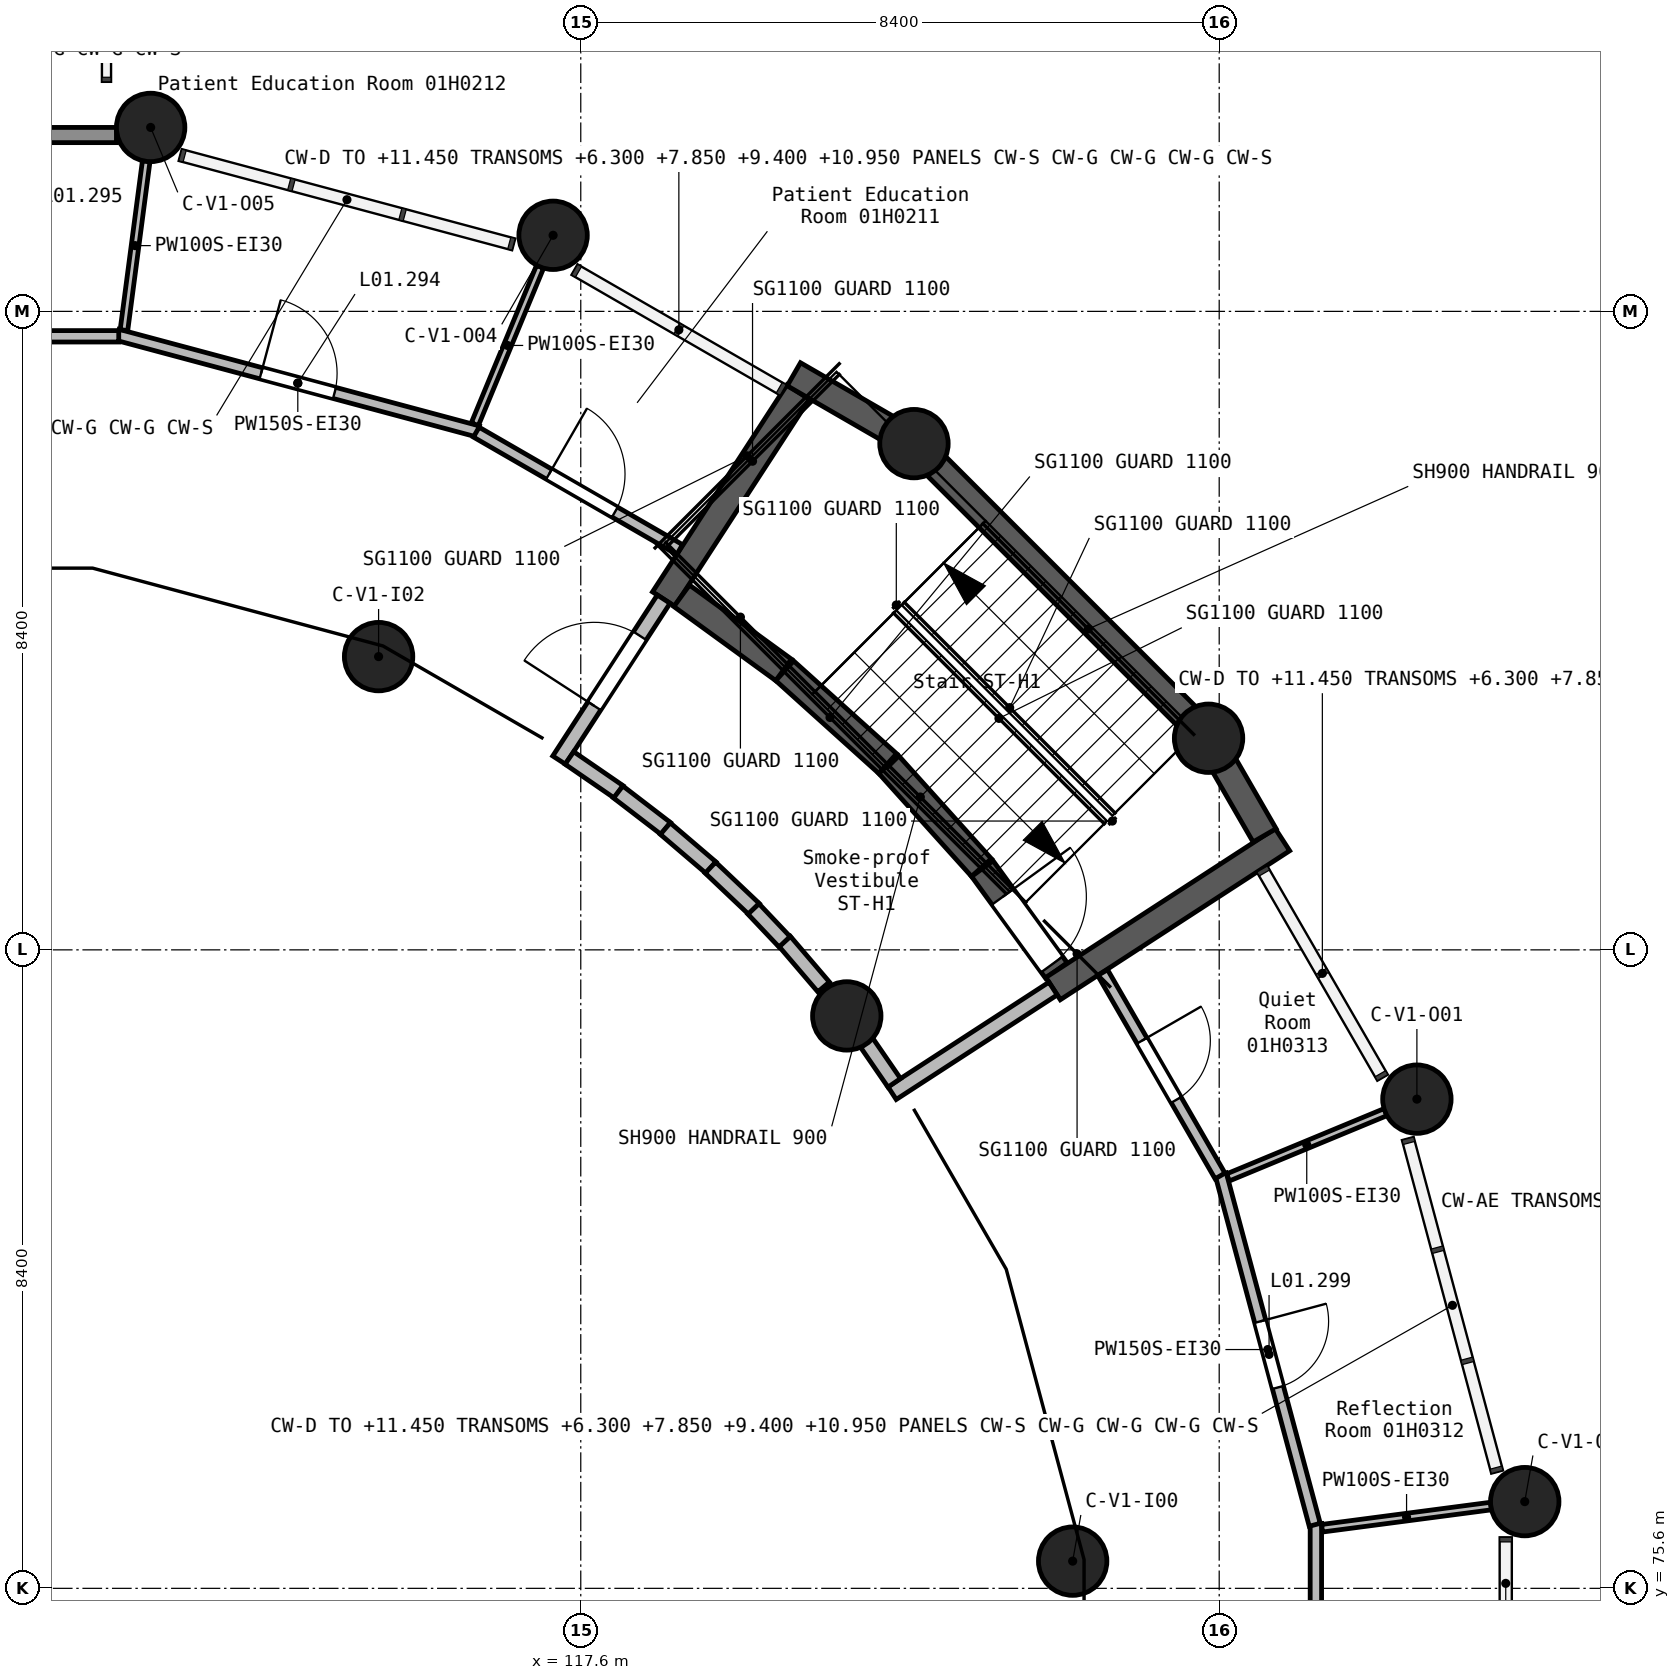
"""IFC4 building model, lengths in metres.
Left out: names, types, materials, properties, quantities, classifications, styles, units other than length and angle.
Written with IfcOpenShell. Run it as: python <this file> out.ifc"""

import sys

from ifc_helpers import new_model, si_unit, direction, frame, frame_2d, origin, origin_2d, place, context, subcontext, project, spatial, rectangle, circle, extrude, element, fill, save


model = new_model("IFC4")
c1 = context("Model", 3, precision=1e-05, world=origin(), true_north=direction((0.0, 1.0)))
c2 = subcontext(c1, "Body", "Model", "MODEL_VIEW")
j1 = project(units=[si_unit("LENGTHUNIT", "METRE"), si_unit("PLANEANGLEUNIT", "RADIAN")], contexts=[c1])
p1 = place(None, origin())
s1 = spatial("IfcSite", under=j1, at=p1, CompositionType="ELEMENT")
p2 = place(p1, origin())
s2 = spatial("IfcBuilding", under=s1, at=p2, CompositionType="ELEMENT")
p3 = place(p2, frame((0.0, 0.0, 5.4)))
s3 = spatial("IfcBuildingStorey", under=s2, at=p3, CompositionType="ELEMENT", Elevation=5.4)
for number, where, z_axis, x_axis in (
    (1, (111.941, 94.82, 0.0), (0.0, 0.0, 1.0), (1.0, 0.0, 0.0)),
    (2, (114.94, 87.858, 0.0), (0.0, 0.0, 1.0), (1.0, 0.0, 0.0)),
    (3, (117.236, 93.401, 0.0), (0.0, 0.0, 1.0), (1.0, 0.0, 0.0)),
    (4, (121.1, 83.131, 0.0), (0.0, 0.0, 1.0), (1.0, 0.0, 0.0)),
    (5, (121.984, 90.66, 0.0), (0.0, 0.0, 1.0), (1.0, 0.0, 0.0)),
    (6, (124.072, 75.958, 0.0), (0.0, 0.0, 1.0), (1.0, 0.0, 0.0)),
    (7, (125.86, 86.784, 0.0), (0.0, 0.0, 1.0), (1.0, 0.0, 0.0)),
    (8, (128.601, 82.036, 0.0), (0.0, 0.0, 1.0), (1.0, 0.0, 0.0)),
    (9, (130.02, 76.741, 0.0), (0.0, 0.0, 1.0), (1.0, 0.0, 0.0)),
):
    element("IfcColumn", number, at=place(p3, frame(where, z_axis=z_axis, x_axis=x_axis)), inside=s3, PredefinedType="COLUMN", context=c2, shape_type="SweptSolid", body=[
        extrude(circle(Radius=0.45, at=origin_2d()), origin(), (0.0, 0.0, 1.0), 4.5),
    ])
p4 = place(p3, frame((118.691, 88.614, 0.0), z_axis=(0.0, 0.0, 1.0), x_axis=(0.544668615038, 0.838651357712, 0.0)))
e10 = element("IfcWall", 10, at=p4, inside=s3, PredefinedType="SHEAR", context=c2, shape_type="SweptSolid", body=[
    extrude(rectangle(XDim=3.248, YDim=0.35, at=frame_2d((1.624, 0.0))), origin(), (0.0, 0.0, 1.0), 4.5),
])
p5 = place(p3, frame((118.927, 88.658, 0.0), z_axis=(0.0, 0.0, 1.0), x_axis=(0.808869786542, -0.587987813155, 0.0)))
e11 = element("IfcWall", 11, at=p5, inside=s3, PredefinedType="SHEAR", context=c2, shape_type="SweptSolid", body=[
    extrude(rectangle(XDim=1.658, YDim=0.35, at=frame_2d((0.829, 0.0))), origin(), (0.0, 0.0, 1.0), 4.5),
])
p6 = place(p3, frame((120.283, 87.672, 0.0), z_axis=(0.0, 0.0, 1.0), x_axis=(0.743081147279, -0.669201321397, 0.0)))
e12 = element("IfcWall", 12, at=p6, inside=s3, PredefinedType="SHEAR", context=c2, shape_type="SweptSolid", body=[
    extrude(rectangle(XDim=1.824, YDim=0.35, at=frame_2d((0.912, 0.0))), origin(), (0.0, 0.0, 1.0), 4.5),
])
p7 = place(p3, frame((120.404, 91.573, 0.0), z_axis=(0.0, 0.0, 1.0), x_axis=(0.866050214951, -0.499957023337, 0.0)))
e13 = element("IfcWall", 13, at=p7, inside=s3, PredefinedType="SHEAR", context=c2, shape_type="SweptSolid", body=[
    extrude(rectangle(XDim=1.802, YDim=0.35, at=frame_2d((0.901, 0.0))), origin(), (0.0, 0.0, 1.0), 4.5),
])
p8 = place(p3, frame((121.651, 86.438, 0.0), z_axis=(0.0, 0.0, 1.0), x_axis=(0.669201321397, -0.743081147279, 0.0)))
e14 = element("IfcWall", 14, at=p8, inside=s3, PredefinedType="SHEAR", context=c2, shape_type="SweptSolid", body=[
    extrude(rectangle(XDim=1.824, YDim=0.35, at=frame_2d((0.912, 0.0))), origin(), (0.0, 0.0, 1.0), 4.5),
])
p9 = place(p3, frame((122.0, 90.644, 0.0), z_axis=(0.0, 0.0, 1.0), x_axis=(0.707106781187, -0.707106781187, 0.0)))
e15 = element("IfcWall", 15, at=p9, inside=s3, PredefinedType="SHEAR", context=c2, shape_type="SweptSolid", body=[
    extrude(rectangle(XDim=5.436, YDim=0.35, at=frame_2d((2.718, 0.0))), origin(), (0.0, 0.0, 1.0), 4.5),
])
p10 = place(p3, frame((122.883, 85.069, 0.0), z_axis=(0.0, 0.0, 1.0), x_axis=(0.587987813155, -0.808869786542, 0.0)))
e16 = element("IfcWall", 16, at=p10, inside=s3, PredefinedType="SHEAR", context=c2, shape_type="SweptSolid", body=[
    extrude(rectangle(XDim=1.658, YDim=0.35, at=frame_2d((0.829, 0.0))), origin(), (0.0, 0.0, 1.0), 4.5),
])
p11 = place(p10, frame((0.458, 0.0, 0.0)))
e17 = element("IfcOpeningElement", 17, at=p11, cuts=e16, PredefinedType="OPENING", context=c2, shape_type="SweptSolid", body=[
    extrude(rectangle(XDim=1.1, YDim=2.1, at=frame_2d((0.55, 1.05))), frame((0.0, 0.185, 0.0), z_axis=(0.0, -1.0, 0.0), x_axis=(1.0, 0.0, 0.0)), (0.0, 0.0, 1.0), 0.37),
])
p12 = place(p3, frame((123.814, 83.491, 0.0), z_axis=(0.0, 0.0, 1.0), x_axis=(0.838691576971, 0.544606682587, 0.0)))
e18 = element("IfcWall", 18, at=p12, inside=s3, PredefinedType="SHEAR", context=c2, shape_type="SweptSolid", body=[
    extrude(rectangle(XDim=3.598, YDim=0.35, at=frame_2d((1.799, 0.0))), origin(), (0.0, 0.0, 1.0), 4.5),
])
p13 = place(p3, frame((125.872, 86.764, 0.0), z_axis=(0.0, 0.0, 1.0), x_axis=(0.499882561262, -0.866093196455, 0.0)))
e19 = element("IfcWall", 19, at=p13, inside=s3, PredefinedType="SHEAR", context=c2, shape_type="SweptSolid", body=[
    extrude(rectangle(XDim=1.452, YDim=0.35, at=frame_2d((0.726, 0.0))), origin(), (0.0, 0.0, 1.0), 4.5),
])
p14 = place(p3, frame((111.491, 94.72, 0.0), z_axis=(0.0, 0.0, 1.0), x_axis=(-1.0, 0.0, 0.0)))
e20 = element("IfcWall", 20, at=p14, inside=s3, PredefinedType="STANDARD", context=c2, shape_type="SweptSolid", body=[
    extrude(rectangle(XDim=4.582, YDim=0.2, at=frame_2d((2.291, 0.0))), origin(), (0.0, 0.0, 1.0), 6.05),
])
p15 = place(p14, frame((1.391, 0.0, 0.0)))
e21 = element("IfcOpeningElement", 21, at=p15, cuts=e20, PredefinedType="OPENING", context=c2, shape_type="SweptSolid", body=[
    extrude(rectangle(XDim=1.8, YDim=2.4, at=frame_2d((0.9, 1.2))), frame((0.0, 0.11, 0.0), z_axis=(0.0, -1.0, 0.0), x_axis=(1.0, 0.0, 0.0)), (0.0, 0.0, 1.0), 0.22),
])
p16 = place(p3, frame((117.315, 86.496, 0.0), z_axis=(0.0, 0.0, 1.0), x_axis=(0.544553338247, 0.838726213853, 0.0)))
e22 = element("IfcWall", 22, at=p16, inside=s3, PredefinedType="SOLIDWALL", context=c2, shape_type="SweptSolid", body=[
    extrude(rectangle(XDim=2.525, YDim=0.2, at=frame_2d((1.263, 0.0))), origin(), (0.0, 0.0, 1.0), 4.15),
])
p17 = place(p16, frame((0.85, 0.0, 0.0)))
e23 = element("IfcOpeningElement", 23, at=p17, cuts=e22, PredefinedType="OPENING", context=c2, shape_type="SweptSolid", body=[
    extrude(rectangle(XDim=1.1, YDim=2.1, at=frame_2d((0.55, 1.05))), frame((0.0, 0.11, 0.0), z_axis=(0.0, -1.0, 0.0), x_axis=(1.0, 0.0, 0.0)), (0.0, 0.0, 1.0), 0.22),
])
p18 = place(p3, frame((121.696, 82.115, 0.0), z_axis=(0.0, 0.0, 1.0), x_axis=(0.838726213853, 0.544553338247, 0.0)))
e24 = element("IfcWall", 24, at=p18, inside=s3, PredefinedType="SOLIDWALL", context=c2, shape_type="SweptSolid", body=[
    extrude(rectangle(XDim=2.525, YDim=0.2, at=frame_2d((1.263, 0.0))), origin(), (0.0, 0.0, 1.0), 4.15),
])
p19 = place(p3, frame((121.335, 82.817, 0.0), z_axis=(0.0, 0.0, 1.0), x_axis=(0.56675458302, -0.823886668557, 0.0)))
e25 = element("IfcWall", 25, at=p19, inside=s3, PredefinedType="SOLIDWALL", context=c2, shape_type="SweptSolid", body=[
    extrude(rectangle(XDim=0.688, YDim=0.2, at=frame_2d((0.344, 0.0))), origin(), (0.0, 0.0, 1.0), 4.15),
])
p20 = place(p3, frame((117.45, 86.525, 0.0), z_axis=(0.0, 0.0, 1.0), x_axis=(0.823906287356, -0.566726062269, 0.0)))
e26 = element("IfcWall", 26, at=p20, inside=s3, PredefinedType="SOLIDWALL", context=c2, shape_type="SweptSolid", body=[
    extrude(rectangle(XDim=0.788, YDim=0.2, at=frame_2d((0.394, 0.0))), origin(), (0.0, 0.0, 1.0), 4.15),
])
for number, where, z_axis, x_axis in (
    (27, (118.092, 86.077, 0.0), (0.0, 0.0, 1.0), (0.793, -0.609, 0.0)),
    (28, (120.282, 84.113, 0.0), (0.0, 0.0, 1.0), (0.65, -0.76, 0.0)),
):
    element("IfcWall", number, at=place(p3, frame(where, z_axis=z_axis, x_axis=x_axis)), inside=s3, PredefinedType="SOLIDWALL", context=c2, shape_type="SweptSolid", body=[
        extrude(rectangle(XDim=0.79, YDim=0.2, at=frame_2d((0.395, 0.0))), origin(), (0.0, 0.0, 1.0), 4.15),
    ])
p21 = place(p3, frame((118.712, 85.595, 0.0), z_axis=(0.0, 0.0, 1.0), x_axis=(0.760389572583, -0.649467241597, 0.0)))
e29 = element("IfcWall", 29, at=p21, inside=s3, PredefinedType="SOLIDWALL", context=c2, shape_type="SweptSolid", body=[
    extrude(rectangle(XDim=0.79, YDim=0.2, at=frame_2d((0.395, 0.0))), origin(), (0.0, 0.0, 1.0), 4.15),
])
p22 = place(p3, frame((119.306, 85.082, 0.0), z_axis=(0.0, 0.0, 1.0), x_axis=(0.726001390363, -0.687693231893, 0.0)))
e30 = element("IfcWall", 30, at=p22, inside=s3, PredefinedType="SOLIDWALL", context=c2, shape_type="SweptSolid", body=[
    extrude(rectangle(XDim=0.79, YDim=0.2, at=frame_2d((0.395, 0.0))), origin(), (0.0, 0.0, 1.0), 4.15),
])
p23 = place(p3, frame((119.872, 84.538, 0.0), z_axis=(0.0, 0.0, 1.0), x_axis=(0.687562563481, -0.726125141624, 0.0)))
e31 = element("IfcWall", 31, at=p23, inside=s3, PredefinedType="SOLIDWALL", context=c2, shape_type="SweptSolid", body=[
    extrude(rectangle(XDim=0.595, YDim=0.2, at=frame_2d((0.298, 0.0))), origin(), (0.0, 0.0, 1.0), 4.15),
])
p24 = place(p3, frame((127.272, 71.545, 0.0), z_axis=(0.0, 0.0, 1.0), x_axis=(0.0, 1.0, 0.0)))
e32 = element("IfcWall", 32, at=p24, inside=s3, PredefinedType="PARTITIONING", context=c2, shape_type="SweptSolid", body=[
    extrude(rectangle(XDim=4.91, YDim=0.15, at=frame_2d((2.455, 0.0))), origin(), (0.0, 0.0, 1.0), 4.15),
])
p25 = place(p24, frame((2.005, 0.0, 0.0)))
e33 = element("IfcOpeningElement", 33, at=p25, cuts=e32, PredefinedType="OPENING", context=c2, shape_type="SweptSolid", body=[
    extrude(rectangle(XDim=0.9, YDim=2.1, at=frame_2d((0.45, 1.05))), frame((0.0, 0.085, 0.0), z_axis=(0.0, -1.0, 0.0), x_axis=(1.0, 0.0, 0.0)), (0.0, 0.0, 1.0), 0.17),
])
p26 = place(p3, frame((111.507, 92.091, 0.0), z_axis=(0.0, 0.0, 1.0), x_axis=(0.965901416029, -0.258910128254, 0.0)))
e34 = element("IfcWall", 34, at=p26, inside=s3, PredefinedType="PARTITIONING", context=c2, shape_type="SweptSolid", body=[
    extrude(rectangle(XDim=4.908, YDim=0.15, at=frame_2d((2.454, 0.0))), origin(), (0.0, 0.0, 1.0), 4.15),
])
p27 = place(p26, frame((1.954, 0.0, 0.0)))
e35 = element("IfcOpeningElement", 35, at=p27, cuts=e34, PredefinedType="OPENING", context=c2, shape_type="SweptSolid", body=[
    extrude(rectangle(XDim=1.0, YDim=2.1, at=frame_2d((0.5, 1.05))), frame((0.0, 0.085, 0.0), z_axis=(0.0, -1.0, 0.0), x_axis=(1.0, 0.0, 0.0)), (0.0, 0.0, 1.0), 0.17),
])
p28 = place(p3, frame((106.879, 92.072, 0.0), z_axis=(0.0, 0.0, 1.0), x_axis=(1.0, 0.0, 0.0)))
e36 = element("IfcWall", 36, at=p28, inside=s3, PredefinedType="PARTITIONING", context=c2, shape_type="SweptSolid", body=[
    extrude(rectangle(XDim=4.642, YDim=0.15, at=frame_2d((2.321, 0.0))), origin(), (0.0, 0.0, 1.0), 4.15),
])
p29 = place(p28, frame((1.821, 0.0, 0.0)))
e37 = element("IfcOpeningElement", 37, at=p29, cuts=e36, PredefinedType="OPENING", context=c2, shape_type="SweptSolid", body=[
    extrude(rectangle(XDim=1.0, YDim=2.1, at=frame_2d((0.5, 1.05))), frame((0.0, 0.085, 0.0), z_axis=(0.0, -1.0, 0.0), x_axis=(1.0, 0.0, 0.0)), (0.0, 0.0, 1.0), 0.17),
])
p30 = place(p3, frame((126.021, 81.047, 0.0), z_axis=(0.0, 0.0, 1.0), x_axis=(0.259008724248, -0.965874981953, 0.0)))
e38 = element("IfcWall", 38, at=p30, inside=s3, PredefinedType="PARTITIONING", context=c2, shape_type="SweptSolid", body=[
    extrude(rectangle(XDim=4.774, YDim=0.15, at=frame_2d((2.387, 0.0))), origin(), (0.0, 0.0, 1.0), 4.15),
])
p31 = place(p30, frame((2.004, 0.0, 0.0)))
e39 = element("IfcOpeningElement", 39, at=p31, cuts=e38, PredefinedType="OPENING", context=c2, shape_type="SweptSolid", body=[
    extrude(rectangle(XDim=0.9, YDim=2.1, at=frame_2d((0.45, 1.05))), frame((0.0, 0.085, 0.0), z_axis=(0.0, -1.0, 0.0), x_axis=(1.0, 0.0, 0.0)), (0.0, 0.0, 1.0), 0.17),
])
p32 = place(p3, frame((124.467, 83.701, 0.0), z_axis=(0.0, 0.0, 1.0), x_axis=(0.499895749011, -0.866085584755, 0.0)))
e40 = element("IfcWall", 40, at=p32, inside=s3, PredefinedType="PARTITIONING", context=c2, shape_type="SweptSolid", body=[
    extrude(rectangle(XDim=3.09, YDim=0.15, at=frame_2d((1.545, 0.0))), origin(), (0.0, 0.0, 1.0), 4.15),
])
p33 = place(p32, frame((1.034, 0.0, 0.0)))
e41 = element("IfcOpeningElement", 41, at=p33, cuts=e40, PredefinedType="OPENING", context=c2, shape_type="SweptSolid", body=[
    extrude(rectangle(XDim=0.9, YDim=2.1, at=frame_2d((0.45, 1.05))), frame((0.0, 0.085, 0.0), z_axis=(0.0, -1.0, 0.0), x_axis=(1.0, 0.0, 0.0)), (0.0, 0.0, 1.0), 0.17),
])
p34 = place(p3, frame((116.225, 90.811, 0.0), z_axis=(0.0, 0.0, 1.0), x_axis=(0.866085584755, -0.499895749011, 0.0)))
e42 = element("IfcWall", 42, at=p34, inside=s3, PredefinedType="PARTITIONING", context=c2, shape_type="SweptSolid", body=[
    extrude(rectangle(XDim=3.09, YDim=0.15, at=frame_2d((1.545, 0.0))), origin(), (0.0, 0.0, 1.0), 4.15),
])
p35 = place(p34, frame((1.105, 0.0, 0.0)))
e43 = element("IfcOpeningElement", 43, at=p35, cuts=e42, PredefinedType="OPENING", context=c2, shape_type="SweptSolid", body=[
    extrude(rectangle(XDim=1.0, YDim=2.1, at=frame_2d((0.5, 1.05))), frame((0.0, 0.085, 0.0), z_axis=(0.0, -1.0, 0.0), x_axis=(1.0, 0.0, 0.0)), (0.0, 0.0, 1.0), 0.17),
])
p36 = place(p3, frame((116.206, 90.916, 0.0), z_axis=(0.0, 0.0, 1.0), x_axis=(0.382829249812, 0.923819119465, 0.0)))
e44 = element("IfcWall", 44, at=p36, inside=s3, PredefinedType="PARTITIONING", context=c2, shape_type="SweptSolid", body=[
    extrude(rectangle(XDim=2.243, YDim=0.1, at=frame_2d((1.122, 0.0))), origin(), (0.0, 0.0, 1.0), 4.15),
])
p37 = place(p3, frame((126.116, 81.006, 0.0), z_axis=(0.0, 0.0, 1.0), x_axis=(0.923835070081, 0.382790756536, 0.0)))
e45 = element("IfcWall", 45, at=p37, inside=s3, PredefinedType="PARTITIONING", context=c2, shape_type="SweptSolid", body=[
    extrude(rectangle(XDim=2.243, YDim=0.1, at=frame_2d((1.122, 0.0))), origin(), (0.0, 0.0, 1.0), 4.15),
])
p38 = place(p3, frame((111.59, 92.153, 0.0), z_axis=(0.0, 0.0, 1.0), x_axis=(0.13062345865, 0.991432051151, 0.0)))
e46 = element("IfcWall", 46, at=p38, inside=s3, PredefinedType="PARTITIONING", context=c2, shape_type="SweptSolid", body=[
    extrude(rectangle(XDim=2.243, YDim=0.1, at=frame_2d((1.122, 0.0))), origin(), (0.0, 0.0, 1.0), 4.15),
])
p39 = place(p3, frame((127.354, 76.391, 0.0), z_axis=(0.0, 0.0, 1.0), x_axis=(0.991472443169, 0.130316516358, 0.0)))
e47 = element("IfcWall", 47, at=p39, inside=s3, PredefinedType="PARTITIONING", context=c2, shape_type="SweptSolid", body=[
    extrude(rectangle(XDim=2.242, YDim=0.1, at=frame_2d((1.121, 0.0))), origin(), (0.0, 0.0, 1.0), 4.15),
])
p40 = place(p35, origin())
e48 = element("IfcDoor", 48, at=p40, inside=s3, OperationType="SINGLE_SWING_RIGHT", PredefinedType="DOOR", context=c2, shape_type="SweptSolid", body=[
    extrude(rectangle(XDim=1.0, YDim=2.1, at=frame_2d((0.5, 1.05))), frame((0.0, 0.025, 0.0), z_axis=(0.0, -1.0, 0.0), x_axis=(1.0, 0.0, 0.0)), (0.0, 0.0, 1.0), 0.05),
])
fill(e43, e48)
p41 = place(p27, origin())
e49 = element("IfcDoor", 49, at=p41, inside=s3, OperationType="SINGLE_SWING_LEFT", PredefinedType="DOOR", context=c2, shape_type="SweptSolid", body=[
    extrude(rectangle(XDim=1.0, YDim=2.1, at=frame_2d((0.5, 1.05))), frame((0.0, 0.025, 0.0), z_axis=(0.0, -1.0, 0.0), x_axis=(1.0, 0.0, 0.0)), (0.0, 0.0, 1.0), 0.05),
])
fill(e35, e49)
p42 = place(p31, origin())
e50 = element("IfcDoor", 50, at=p42, inside=s3, OperationType="SINGLE_SWING_RIGHT", PredefinedType="DOOR", context=c2, shape_type="SweptSolid", body=[
    extrude(rectangle(XDim=0.9, YDim=2.1, at=frame_2d((0.45, 1.05))), frame((0.0, 0.025, 0.0), z_axis=(0.0, -1.0, 0.0), x_axis=(1.0, 0.0, 0.0)), (0.0, 0.0, 1.0), 0.05),
])
fill(e39, e50)
p43 = place(p33, origin())
e51 = element("IfcDoor", 51, at=p43, inside=s3, OperationType="SINGLE_SWING_LEFT", PredefinedType="DOOR", context=c2, shape_type="SweptSolid", body=[
    extrude(rectangle(XDim=0.9, YDim=2.1, at=frame_2d((0.45, 1.05))), frame((0.0, 0.025, 0.0), z_axis=(0.0, -1.0, 0.0), x_axis=(1.0, 0.0, 0.0)), (0.0, 0.0, 1.0), 0.05),
])
fill(e41, e51)
p44 = place(p11, origin())
e52 = element("IfcDoor", 52, at=p44, inside=s3, OperationType="SINGLE_SWING_RIGHT", PredefinedType="DOOR", context=c2, shape_type="SweptSolid", body=[
    extrude(rectangle(XDim=1.1, YDim=2.1, at=frame_2d((0.55, 1.05))), frame((0.0, 0.025, 0.0), z_axis=(0.0, -1.0, 0.0), x_axis=(1.0, 0.0, 0.0)), (0.0, 0.0, 1.0), 0.05),
])
fill(e17, e52)
p45 = place(p17, frame((1.1, 0.0, 0.0), z_axis=(0.0, 0.0, 1.0), x_axis=(-1.0, 0.0, 0.0)))
e53 = element("IfcDoor", 53, at=p45, inside=s3, OperationType="SINGLE_SWING_LEFT", PredefinedType="DOOR", context=c2, shape_type="SweptSolid", body=[
    extrude(rectangle(XDim=1.1, YDim=2.1, at=frame_2d((0.55, 1.05))), frame((0.0, 0.025, 0.0), z_axis=(0.0, -1.0, 0.0), x_axis=(1.0, 0.0, 0.0)), (0.0, 0.0, 1.0), 0.05),
])
fill(e23, e53)
save(model, sys.argv[1])
